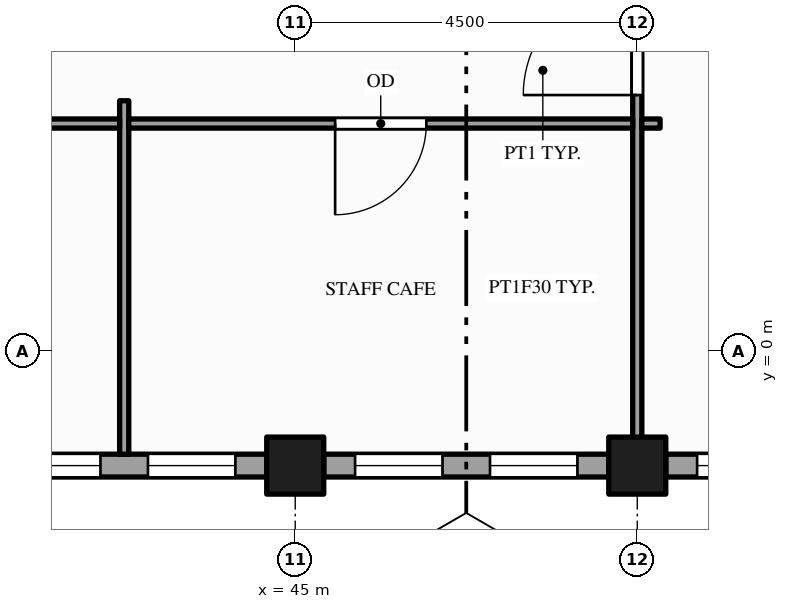
"""IFC4 building model, lengths in metres.
Left out: names, types, materials, properties, quantities, classifications, styles, units other than length and angle.
Written with IfcOpenShell. Run it as: python <this file> out.ifc"""

import sys

from ifc_helpers import new_model, si_unit, direction, frame, frame_2d, origin, origin_2d, place, context, subcontext, project, spatial, rectangle, hollow_rectangle, extrude, element, fill, save


model = new_model("IFC4")
c1 = context("Model", 3, precision=1e-05, world=origin(), true_north=direction((0.0, 1.0)))
c2 = subcontext(c1, "Body", "Model", "MODEL_VIEW")
j1 = project(units=[si_unit("LENGTHUNIT", "METRE"), si_unit("PLANEANGLEUNIT", "RADIAN")], contexts=[c1])
p1 = place(None, origin())
s1 = spatial("IfcSite", under=j1, at=p1, CompositionType="ELEMENT")
p2 = place(p1, origin())
s2 = spatial("IfcBuilding", under=s1, at=p2, CompositionType="ELEMENT")
p3 = place(p2, frame((0.0, 0.0, 195.0)))
s3 = spatial("IfcBuildingStorey", under=s2, at=p3, CompositionType="ELEMENT", Elevation=195.0)
for number, where, z_axis, x_axis in (
    (1, (45.0, -1.5, -0.15), (0.0, 0.0, 1.0), (1.0, 0.0, 0.0)),
    (2, (49.5, -1.5, -0.15), (0.0, 0.0, 1.0), (1.0, 0.0, 0.0)),
):
    element("IfcColumn", number, at=place(p3, frame(where, z_axis=z_axis, x_axis=x_axis)), inside=s3, PredefinedType="COLUMN", context=c2, shape_type="SweptSolid", body=[
        extrude(hollow_rectangle(XDim=0.75, YDim=0.75, WallThickness=0.036, at=origin_2d()), origin(), (0.0, 0.0, 1.0), 4.0),
    ])
p4 = place(p3, frame((40.875, -1.5, 0.0), z_axis=(0.0, 0.0, 1.0), x_axis=(1.0, 0.0, 0.0)))
e3 = element("IfcWall", 3, at=p4, inside=s3, PredefinedType="STANDARD", context=c2, shape_type="SweptSolid", body=[
    extrude(rectangle(XDim=3.75, YDim=0.3, at=frame_2d((1.875, 0.0))), origin(), (0.0, 0.0, 1.0), 2.87),
])
p5 = place(p4, frame((0.413, 0.0, 0.9)))
e4 = element("IfcOpeningElement", 4, at=p5, cuts=e3, PredefinedType="OPENING", context=c2, shape_type="SweptSolid", body=[
    extrude(rectangle(XDim=1.15, YDim=1.75, at=frame_2d((0.575, 0.875))), frame((0.0, 0.16, 0.0), z_axis=(0.0, -1.0, 0.0), x_axis=(1.0, 0.0, 0.0)), (0.0, 0.0, 1.0), 0.32),
])
p6 = place(p4, frame((2.188, 0.0, 0.9)))
e5 = element("IfcOpeningElement", 5, at=p6, cuts=e3, PredefinedType="OPENING", context=c2, shape_type="SweptSolid", body=[
    extrude(rectangle(XDim=1.15, YDim=1.75, at=frame_2d((0.575, 0.875))), frame((0.0, 0.16, 0.0), z_axis=(0.0, -1.0, 0.0), x_axis=(1.0, 0.0, 0.0)), (0.0, 0.0, 1.0), 0.32),
])
p7 = place(p3, frame((45.375, -1.5, 0.0), z_axis=(0.0, 0.0, 1.0), x_axis=(1.0, 0.0, 0.0)))
e6 = element("IfcWall", 6, at=p7, inside=s3, PredefinedType="STANDARD", context=c2, shape_type="SweptSolid", body=[
    extrude(rectangle(XDim=3.75, YDim=0.3, at=frame_2d((1.875, 0.0))), origin(), (0.0, 0.0, 1.0), 2.87),
])
p8 = place(p7, frame((0.413, 0.0, 0.9)))
e7 = element("IfcOpeningElement", 7, at=p8, cuts=e6, PredefinedType="OPENING", context=c2, shape_type="SweptSolid", body=[
    extrude(rectangle(XDim=1.15, YDim=1.75, at=frame_2d((0.575, 0.875))), frame((0.0, 0.16, 0.0), z_axis=(0.0, -1.0, 0.0), x_axis=(1.0, 0.0, 0.0)), (0.0, 0.0, 1.0), 0.32),
])
p9 = place(p7, frame((2.188, 0.0, 0.9)))
e8 = element("IfcOpeningElement", 8, at=p9, cuts=e6, PredefinedType="OPENING", context=c2, shape_type="SweptSolid", body=[
    extrude(rectangle(XDim=1.15, YDim=1.75, at=frame_2d((0.575, 0.875))), frame((0.0, 0.16, 0.0), z_axis=(0.0, -1.0, 0.0), x_axis=(1.0, 0.0, 0.0)), (0.0, 0.0, 1.0), 0.32),
])
p10 = place(p3, frame((49.875, -1.5, 0.0), z_axis=(0.0, 0.0, 1.0), x_axis=(1.0, 0.0, 0.0)))
e9 = element("IfcWall", 9, at=p10, inside=s3, PredefinedType="STANDARD", context=c2, shape_type="SweptSolid", body=[
    extrude(rectangle(XDim=3.75, YDim=0.3, at=frame_2d((1.875, 0.0))), origin(), (0.0, 0.0, 1.0), 2.87),
])
p11 = place(p10, frame((0.413, 0.0, 0.9)))
e10 = element("IfcOpeningElement", 10, at=p11, cuts=e9, PredefinedType="OPENING", context=c2, shape_type="SweptSolid", body=[
    extrude(rectangle(XDim=1.15, YDim=1.75, at=frame_2d((0.575, 0.875))), frame((0.0, 0.16, 0.0), z_axis=(0.0, -1.0, 0.0), x_axis=(1.0, 0.0, 0.0)), (0.0, 0.0, 1.0), 0.32),
])
p12 = place(p10, frame((2.188, 0.0, 0.9)))
e11 = element("IfcOpeningElement", 11, at=p12, cuts=e9, PredefinedType="OPENING", context=c2, shape_type="SweptSolid", body=[
    extrude(rectangle(XDim=1.15, YDim=1.75, at=frame_2d((0.575, 0.875))), frame((0.0, 0.16, 0.0), z_axis=(0.0, -1.0, 0.0), x_axis=(1.0, 0.0, 0.0)), (0.0, 0.0, 1.0), 0.32),
])
p13 = place(p3, frame((42.75, -1.35, 0.0), z_axis=(0.0, 0.0, 1.0), x_axis=(0.0, 1.0, 0.0)))
e12 = element("IfcWall", 12, at=p13, inside=s3, PredefinedType="PARTITIONING", context=c2, shape_type="SweptSolid", body=[
    extrude(rectangle(XDim=4.65, YDim=0.12, at=frame_2d((2.325, 0.0))), origin(), (0.0, 0.0, 1.0), 2.87),
])
p14 = place(p3, frame((49.5, -1.35, 0.0), z_axis=(0.0, 0.0, 1.0), x_axis=(0.0, 1.0, 0.0)))
e13 = element("IfcWall", 13, at=p14, inside=s3, PredefinedType="PARTITIONING", context=c2, shape_type="SweptSolid", body=[
    extrude(rectangle(XDim=22.2, YDim=0.12, at=frame_2d((11.1, 0.0))), origin(), (0.0, 0.0, 1.0), 2.87),
])
p15 = place(p14, frame((4.725, 0.0, 0.0)))
e14 = element("IfcOpeningElement", 14, at=p15, cuts=e13, PredefinedType="OPENING", context=c2, shape_type="SweptSolid", body=[
    extrude(rectangle(XDim=1.5, YDim=2.1, at=frame_2d((0.75, 1.05))), frame((0.0, 0.07, 0.0), z_axis=(0.0, -1.0, 0.0), x_axis=(1.0, 0.0, 0.0)), (0.0, 0.0, 1.0), 0.14),
])
p16 = place(p14, frame((15.975, 0.0, 0.0)))
e15 = element("IfcOpeningElement", 15, at=p16, cuts=e13, PredefinedType="OPENING", context=c2, shape_type="SweptSolid", body=[
    extrude(rectangle(XDim=1.5, YDim=2.1, at=frame_2d((0.75, 1.05))), frame((0.0, 0.07, 0.0), z_axis=(0.0, -1.0, 0.0), x_axis=(1.0, 0.0, 0.0)), (0.0, 0.0, 1.0), 0.14),
])
p17 = place(p14, frame((7.6, 0.0, 0.0)))
e16 = element("IfcOpeningElement", 16, at=p17, cuts=e13, PredefinedType="OPENING", context=c2, shape_type="SweptSolid", body=[
    extrude(rectangle(XDim=0.9, YDim=2.1, at=frame_2d((0.45, 1.05))), frame((0.0, 0.07, 0.0), z_axis=(0.0, -1.0, 0.0), x_axis=(1.0, 0.0, 0.0)), (0.0, 0.0, 1.0), 0.14),
])
p18 = place(p14, frame((10.65, 0.0, 0.0)))
e17 = element("IfcOpeningElement", 17, at=p18, cuts=e13, PredefinedType="OPENING", context=c2, shape_type="SweptSolid", body=[
    extrude(rectangle(XDim=0.9, YDim=2.1, at=frame_2d((0.45, 1.05))), frame((0.0, 0.07, 0.0), z_axis=(0.0, -1.0, 0.0), x_axis=(1.0, 0.0, 0.0)), (0.0, 0.0, 1.0), 0.14),
])
p19 = place(p14, frame((13.6, 0.0, 0.0)))
e18 = element("IfcOpeningElement", 18, at=p19, cuts=e13, PredefinedType="OPENING", context=c2, shape_type="SweptSolid", body=[
    extrude(rectangle(XDim=1.0, YDim=2.1, at=frame_2d((0.5, 1.05))), frame((0.0, 0.07, 0.0), z_axis=(0.0, -1.0, 0.0), x_axis=(1.0, 0.0, 0.0)), (0.0, 0.0, 1.0), 0.14),
])
p20 = place(p3, frame((38.31, 3.0, 0.0), z_axis=(0.0, 0.0, 1.0), x_axis=(1.0, 0.0, 0.0)))
e19 = element("IfcWall", 19, at=p20, inside=s3, PredefinedType="PARTITIONING", context=c2, shape_type="SweptSolid", body=[
    extrude(rectangle(XDim=4.38, YDim=0.12, at=frame_2d((2.19, 0.0))), origin(), (0.0, 0.0, 1.0), 2.87),
])
p21 = place(p20, frame((1.69, 0.0, 0.0)))
e20 = element("IfcOpeningElement", 20, at=p21, cuts=e19, PredefinedType="OPENING", context=c2, shape_type="SweptSolid", body=[
    extrude(rectangle(XDim=1.0, YDim=2.1, at=frame_2d((0.5, 1.05))), frame((0.0, 0.07, 0.0), z_axis=(0.0, -1.0, 0.0), x_axis=(1.0, 0.0, 0.0)), (0.0, 0.0, 1.0), 0.14),
])
p22 = place(p3, frame((42.81, 3.0, 0.0), z_axis=(0.0, 0.0, 1.0), x_axis=(1.0, 0.0, 0.0)))
e21 = element("IfcWall", 21, at=p22, inside=s3, PredefinedType="PARTITIONING", context=c2, shape_type="SweptSolid", body=[
    extrude(rectangle(XDim=6.63, YDim=0.12, at=frame_2d((3.315, 0.0))), origin(), (0.0, 0.0, 1.0), 2.87),
])
p23 = place(p22, frame((2.715, 0.0, 0.0)))
e22 = element("IfcOpeningElement", 22, at=p23, cuts=e21, PredefinedType="OPENING", context=c2, shape_type="SweptSolid", body=[
    extrude(rectangle(XDim=1.2, YDim=2.1, at=frame_2d((0.6, 1.05))), frame((0.0, 0.07, 0.0), z_axis=(0.0, -1.0, 0.0), x_axis=(1.0, 0.0, 0.0)), (0.0, 0.0, 1.0), 0.14),
])
p24 = place(p3, frame((49.56, 3.0, 0.0), z_axis=(0.0, 0.0, 1.0), x_axis=(1.0, 0.0, 0.0)))
e23 = element("IfcWall", 23, at=p24, inside=s3, PredefinedType="PARTITIONING", context=c2, shape_type="SweptSolid", body=[
    extrude(rectangle(XDim=0.24, YDim=0.12, at=frame_2d((0.12, 0.0))), origin(), (0.0, 0.0, 1.0), 2.87),
])
p25 = place(p5, origin())
e24 = element("IfcWindow", 24, at=p25, inside=s3, PartitioningType="SINGLE_PANEL", PredefinedType="WINDOW", context=c2, shape_type="SweptSolid", body=[
    extrude(rectangle(XDim=1.15, YDim=1.75, at=frame_2d((0.575, 0.875))), frame((0.0, 0.03, 0.0), z_axis=(0.0, -1.0, 0.0), x_axis=(1.0, 0.0, 0.0)), (0.0, 0.0, 1.0), 0.06),
])
fill(e4, e24)
p26 = place(p6, origin())
e25 = element("IfcWindow", 25, at=p26, inside=s3, PartitioningType="SINGLE_PANEL", PredefinedType="WINDOW", context=c2, shape_type="SweptSolid", body=[
    extrude(rectangle(XDim=1.15, YDim=1.75, at=frame_2d((0.575, 0.875))), frame((0.0, 0.03, 0.0), z_axis=(0.0, -1.0, 0.0), x_axis=(1.0, 0.0, 0.0)), (0.0, 0.0, 1.0), 0.06),
])
fill(e5, e25)
p27 = place(p8, origin())
e26 = element("IfcWindow", 26, at=p27, inside=s3, PartitioningType="SINGLE_PANEL", PredefinedType="WINDOW", context=c2, shape_type="SweptSolid", body=[
    extrude(rectangle(XDim=1.15, YDim=1.75, at=frame_2d((0.575, 0.875))), frame((0.0, 0.03, 0.0), z_axis=(0.0, -1.0, 0.0), x_axis=(1.0, 0.0, 0.0)), (0.0, 0.0, 1.0), 0.06),
])
fill(e7, e26)
p28 = place(p9, origin())
e27 = element("IfcWindow", 27, at=p28, inside=s3, PartitioningType="SINGLE_PANEL", PredefinedType="WINDOW", context=c2, shape_type="SweptSolid", body=[
    extrude(rectangle(XDim=1.15, YDim=1.75, at=frame_2d((0.575, 0.875))), frame((0.0, 0.03, 0.0), z_axis=(0.0, -1.0, 0.0), x_axis=(1.0, 0.0, 0.0)), (0.0, 0.0, 1.0), 0.06),
])
fill(e8, e27)
p29 = place(p11, origin())
e28 = element("IfcWindow", 28, at=p29, inside=s3, PartitioningType="SINGLE_PANEL", PredefinedType="WINDOW", context=c2, shape_type="SweptSolid", body=[
    extrude(rectangle(XDim=1.15, YDim=1.75, at=frame_2d((0.575, 0.875))), frame((0.0, 0.03, 0.0), z_axis=(0.0, -1.0, 0.0), x_axis=(1.0, 0.0, 0.0)), (0.0, 0.0, 1.0), 0.06),
])
fill(e10, e28)
p30 = place(p15, origin())
e29 = element("IfcDoor", 29, at=p30, inside=s3, OperationType="SINGLE_SWING_LEFT", PredefinedType="DOOR", context=c2, shape_type="SweptSolid", body=[
    extrude(rectangle(XDim=1.5, YDim=2.1, at=frame_2d((0.75, 1.05))), frame((0.0, 0.025, 0.0), z_axis=(0.0, -1.0, 0.0), x_axis=(1.0, 0.0, 0.0)), (0.0, 0.0, 1.0), 0.05),
])
fill(e14, e29)
p31 = place(p23, origin())
e30 = element("IfcDoor", 30, at=p31, inside=s3, OperationType="SINGLE_SWING_LEFT", PredefinedType="DOOR", context=c2, shape_type="SweptSolid", body=[
    extrude(rectangle(XDim=1.2, YDim=2.1, at=frame_2d((0.6, 1.05))), frame((0.0, 0.025, 0.0), z_axis=(0.0, -1.0, 0.0), x_axis=(1.0, 0.0, 0.0)), (0.0, 0.0, 1.0), 0.05),
])
fill(e22, e30)
save(model, sys.argv[1])
